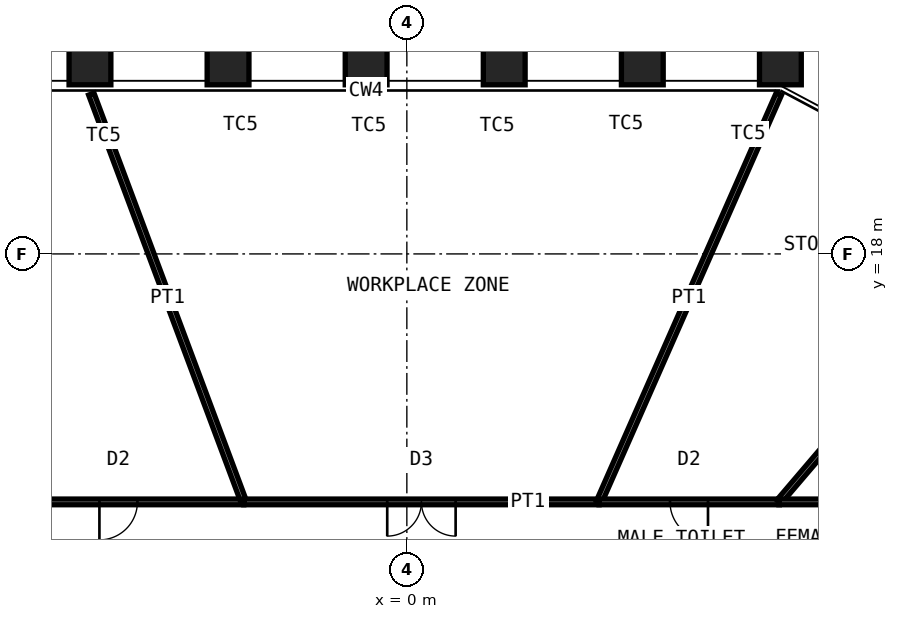
"""IFC4 building model, lengths in metres.
Left out: names, types, materials, properties, quantities, classifications, styles, units other than length and angle.
Written with IfcOpenShell. Run it as: python <this file> out.ifc"""

import sys

from ifc_helpers import new_model, si_unit, direction, frame, frame_2d, origin, origin_2d, place, context, subcontext, project, spatial, rectangle, hollow_rectangle, extrude, element, fill, save


model = new_model("IFC4")
c1 = context("Model", 3, precision=1e-05, world=origin(), true_north=direction((0.0, 1.0)))
c2 = subcontext(c1, "Body", "Model", "MODEL_VIEW")
j1 = project(units=[si_unit("LENGTHUNIT", "METRE"), si_unit("PLANEANGLEUNIT", "RADIAN")], contexts=[c1])
p1 = place(None, origin())
s1 = spatial("IfcSite", under=j1, at=p1, CompositionType="ELEMENT")
p2 = place(p1, origin())
s2 = spatial("IfcBuilding", under=s1, at=p2, CompositionType="ELEMENT")
p3 = place(p2, frame((0.0, 0.0, 184.6)))
s3 = spatial("IfcBuildingStorey", under=s2, at=p3, CompositionType="ELEMENT", Elevation=184.6)
for number, where, z_axis, x_axis in (
    (1, (-8.338, 23.0, 0.0), (0.0, 0.0, 1.0), (-1.0, 0.0, 0.0)),
    (2, (-4.705, 23.0, 0.0), (0.0, 0.0, 1.0), (-1.0, 0.0, 0.0)),
    (3, (-1.071, 23.0, 0.0), (0.0, 0.0, 1.0), (-1.0, 0.0, 0.0)),
    (4, (2.562, 23.0, 0.0), (0.0, 0.0, 1.0), (-1.0, 0.0, 0.0)),
    (5, (6.196, 23.0, 0.0), (0.0, 0.0, 1.0), (-1.0, 0.0, 0.0)),
    (6, (9.829, 23.0, 0.0), (0.0, 0.0, 1.0), (-1.0, 0.0, 0.0)),
):
    element("IfcColumn", number, at=place(p3, frame(where, z_axis=z_axis, x_axis=x_axis)), inside=s3, PredefinedType="COLUMN", context=c2, shape_type="SweptSolid", body=[
        extrude(hollow_rectangle(XDim=1.1, YDim=1.1, WallThickness=0.07, at=origin_2d()), origin(), (0.0, 0.0, 1.0), 4.2),
    ])
p4 = place(p3, frame((-10.889, 11.475, 0.0), z_axis=(0.0, 0.0, 1.0), x_axis=(1.0, 0.0, 0.0)))
e7 = element("IfcWall", 7, at=p4, inside=s3, PredefinedType="PARTITIONING", context=c2, shape_type="SweptSolid", body=[
    extrude(rectangle(XDim=6.598, YDim=0.15, at=frame_2d((3.299, 0.0))), origin(), (0.0, 0.0, 1.0), 4.03),
])
p5 = place(p4, frame((2.799, 0.0, 0.0)))
e8 = element("IfcOpeningElement", 8, at=p5, cuts=e7, PredefinedType="OPENING", context=c2, shape_type="SweptSolid", body=[
    extrude(rectangle(XDim=1.0, YDim=2.4, at=frame_2d((0.5, 1.2))), frame((0.0, 0.085, 0.0), z_axis=(0.0, -1.0, 0.0), x_axis=(1.0, 0.0, 0.0)), (0.0, 0.0, 1.0), 0.17),
])
p6 = place(p3, frame((-8.303, 22.206, 0.0), z_axis=(0.0, 0.0, 1.0), x_axis=(0.350242883069, -0.936658914899, 0.0)))
e9 = element("IfcWall", 9, at=p6, inside=s3, PredefinedType="PARTITIONING", context=c2, shape_type="SweptSolid", body=[
    extrude(rectangle(XDim=11.457, YDim=0.15, at=frame_2d((5.729, 0.0))), origin(), (0.0, 0.0, 1.0), 3.43),
])
p7 = place(p3, frame((-4.291, 11.475, 0.0), z_axis=(0.0, 0.0, 1.0), x_axis=(1.0, 0.0, 0.0)))
e10 = element("IfcWall", 10, at=p7, inside=s3, PredefinedType="PARTITIONING", context=c2, shape_type="SweptSolid", body=[
    extrude(rectangle(XDim=9.349, YDim=0.15, at=frame_2d((4.674, 0.0))), origin(), (0.0, 0.0, 1.0), 4.03),
])
p8 = place(p7, frame((3.774, 0.0, 0.0)))
e11 = element("IfcOpeningElement", 11, at=p8, cuts=e10, PredefinedType="OPENING", context=c2, shape_type="SweptSolid", body=[
    extrude(rectangle(XDim=1.8, YDim=2.4, at=frame_2d((0.9, 1.2))), frame((0.0, 0.085, 0.0), z_axis=(0.0, -1.0, 0.0), x_axis=(1.0, 0.0, 0.0)), (0.0, 0.0, 1.0), 0.17),
])
p9 = place(p3, frame((9.789, 22.208, 0.0), z_axis=(0.0, 0.0, 1.0), x_axis=(-0.403346052835, -0.9150475188, 0.0)))
e12 = element("IfcWall", 12, at=p9, inside=s3, PredefinedType="PARTITIONING", context=c2, shape_type="SweptSolid", body=[
    extrude(rectangle(XDim=11.73, YDim=0.15, at=frame_2d((5.865, 0.0))), origin(), (0.0, 0.0, 1.0), 2.93),
])
p10 = place(p3, frame((5.058, 11.475, 0.0), z_axis=(0.0, 0.0, 1.0), x_axis=(1.0, 0.0, 0.0)))
e13 = element("IfcWall", 13, at=p10, inside=s3, PredefinedType="PARTITIONING", context=c2, shape_type="SweptSolid", body=[
    extrude(rectangle(XDim=4.733, YDim=0.15, at=frame_2d((2.367, 0.0))), origin(), (0.0, 0.0, 1.0), 4.03),
])
p11 = place(p10, frame((1.867, 0.0, 0.0)))
e14 = element("IfcOpeningElement", 14, at=p11, cuts=e13, PredefinedType="OPENING", context=c2, shape_type="SweptSolid", body=[
    extrude(rectangle(XDim=1.0, YDim=2.4, at=frame_2d((0.5, 1.2))), frame((0.0, 0.085, 0.0), z_axis=(0.0, -1.0, 0.0), x_axis=(1.0, 0.0, 0.0)), (0.0, 0.0, 1.0), 0.17),
])
p12 = place(p3, frame((14.958, 17.531, 0.0), z_axis=(0.0, 0.0, 1.0), x_axis=(-0.649097500837, -0.760705221756, 0.0)))
e15 = element("IfcWall", 15, at=p12, inside=s3, PredefinedType="PARTITIONING", context=c2, shape_type="SweptSolid", body=[
    extrude(rectangle(XDim=7.96, YDim=0.15, at=frame_2d((3.98, 0.0))), origin(), (0.0, 0.0, 1.0), 3.43),
])
p13 = place(p3, frame((9.791, 11.475, 0.0), z_axis=(0.0, 0.0, 1.0), x_axis=(1.0, 0.0, 0.0)))
e16 = element("IfcWall", 16, at=p13, inside=s3, PredefinedType="PARTITIONING", context=c2, shape_type="SweptSolid", body=[
    extrude(rectangle(XDim=4.684, YDim=0.15, at=frame_2d((2.342, 0.0))), origin(), (0.0, 0.0, 1.0), 4.03),
])
p14 = place(p5, origin())
e17 = element("IfcDoor", 17, at=p14, inside=s3, OperationType="SINGLE_SWING_LEFT", PredefinedType="DOOR", context=c2, shape_type="SweptSolid", body=[
    extrude(rectangle(XDim=1.0, YDim=2.4, at=frame_2d((0.5, 1.2))), frame((0.0, 0.025, 0.0), z_axis=(0.0, -1.0, 0.0), x_axis=(1.0, 0.0, 0.0)), (0.0, 0.0, 1.0), 0.05),
])
fill(e8, e17)
p15 = place(p8, origin())
e18 = element("IfcDoor", 18, at=p15, inside=s3, OperationType="DOUBLE_DOOR_DOUBLE_SWING", PredefinedType="DOOR", context=c2, shape_type="SweptSolid", body=[
    extrude(rectangle(XDim=1.8, YDim=2.4, at=frame_2d((0.9, 1.2))), frame((0.0, 0.025, 0.0), z_axis=(0.0, -1.0, 0.0), x_axis=(1.0, 0.0, 0.0)), (0.0, 0.0, 1.0), 0.05),
])
fill(e11, e18)
p16 = place(p11, origin())
e19 = element("IfcDoor", 19, at=p16, inside=s3, OperationType="SINGLE_SWING_RIGHT", PredefinedType="DOOR", context=c2, shape_type="SweptSolid", body=[
    extrude(rectangle(XDim=1.0, YDim=2.4, at=frame_2d((0.5, 1.2))), frame((0.0, 0.025, 0.0), z_axis=(0.0, -1.0, 0.0), x_axis=(1.0, 0.0, 0.0)), (0.0, 0.0, 1.0), 0.05),
])
fill(e14, e19)
save(model, sys.argv[1])
